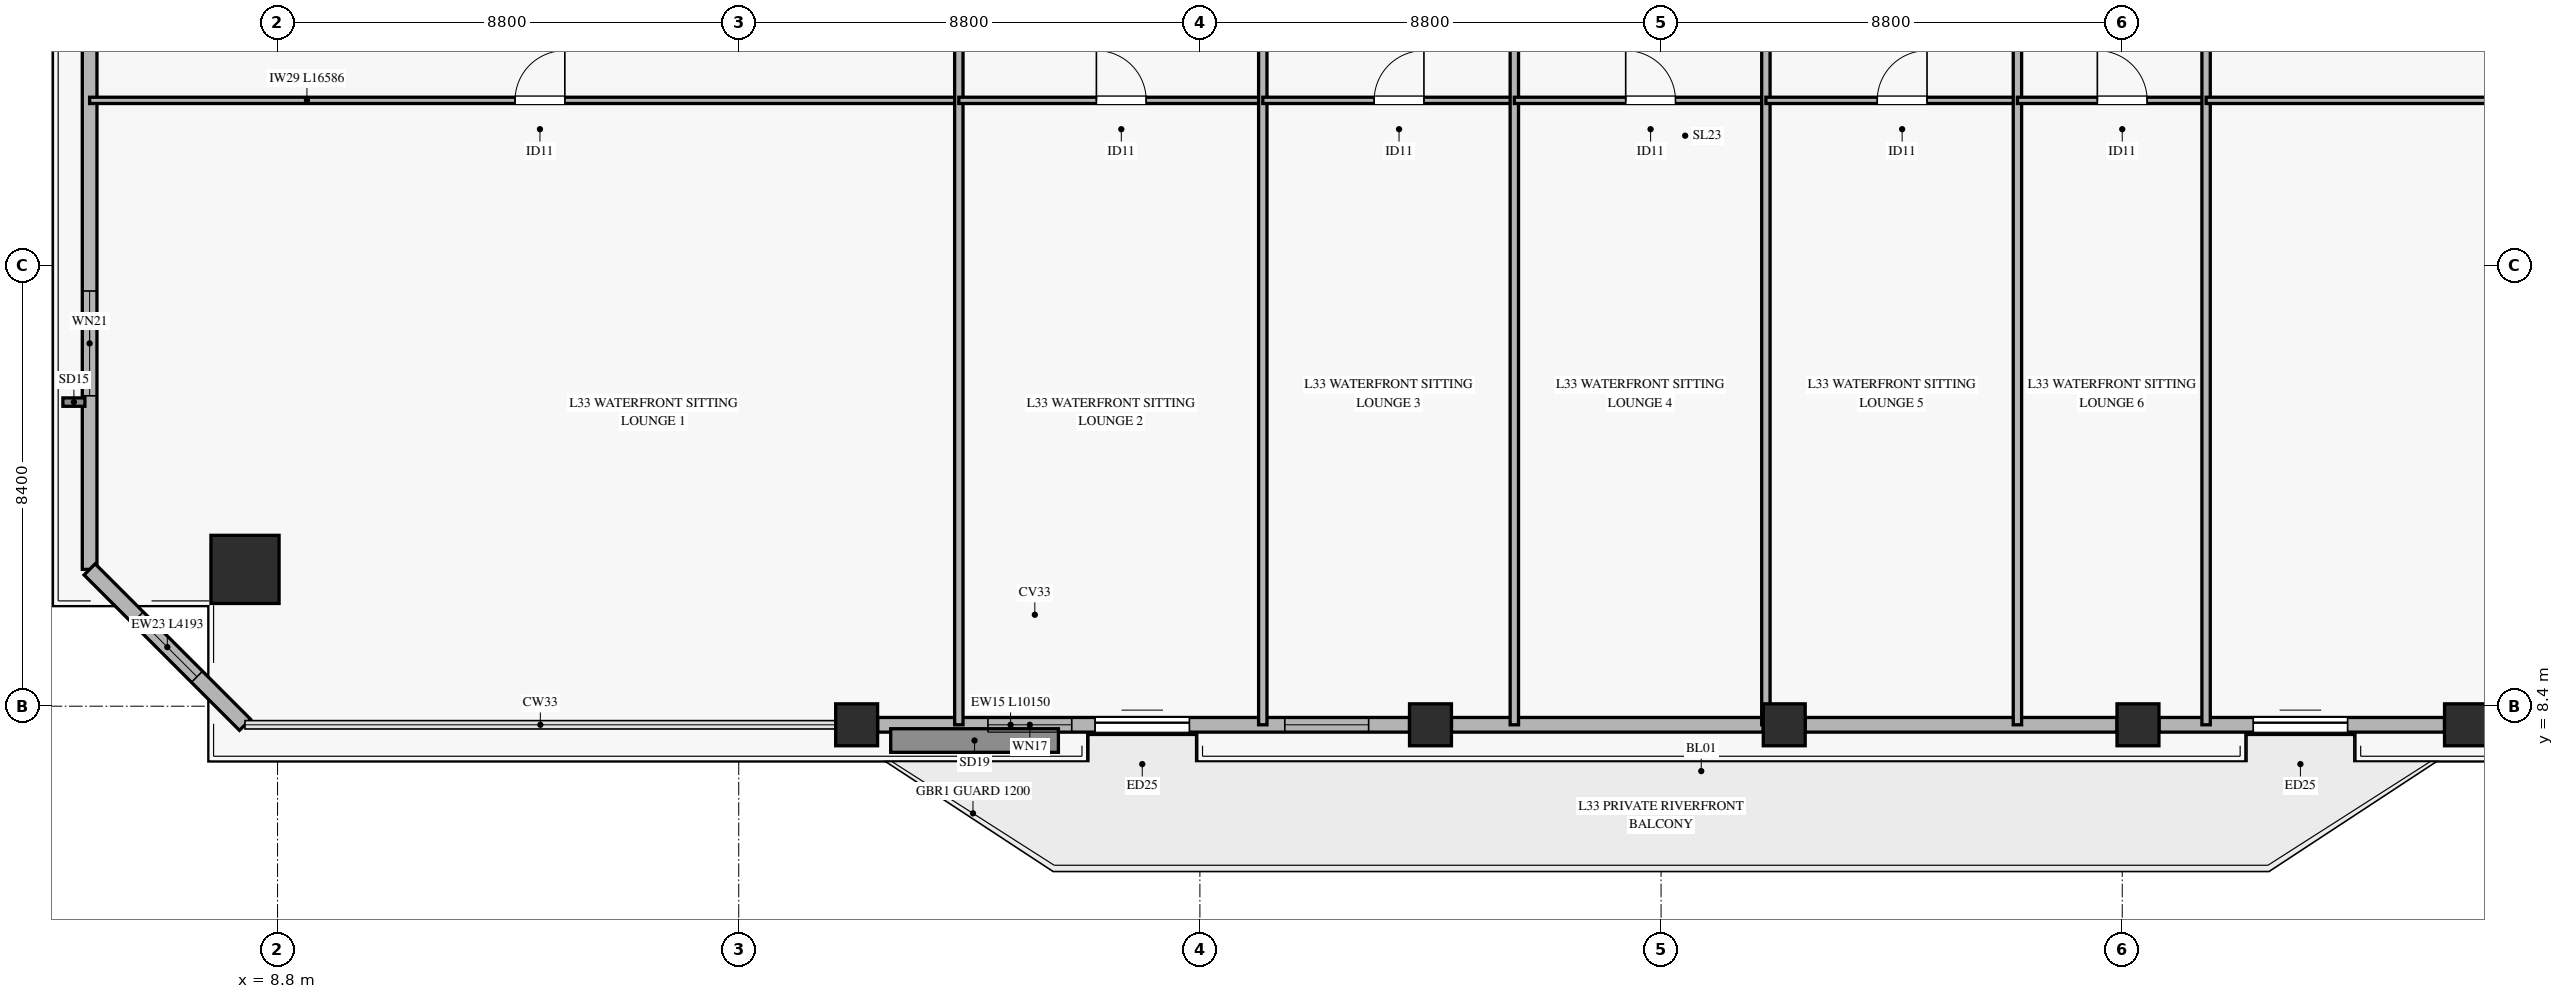
"""IFC4 building model, lengths in metres.
Left out: names, types, materials, properties, quantities, classifications, styles, units other than length and angle.
Written with IfcOpenShell. Run it as: python <this file> out.ifc"""

import sys

from ifc_helpers import new_model, si_unit, direction, frame, frame_2d, origin, origin_2d, place, context, subcontext, project, spatial, rectangle, hollow_rectangle, extrude, source, transform, mapped, element, fill, save


model = new_model("IFC4")
c1 = context("Model", 3, precision=1e-05, world=origin(), true_north=direction((0.0, 1.0)))
c2 = subcontext(c1, "Body", "Model", "MODEL_VIEW")
j1 = project(units=[si_unit("LENGTHUNIT", "METRE"), si_unit("PLANEANGLEUNIT", "RADIAN")], contexts=[c1])
p1 = place(None, origin())
s1 = spatial("IfcSite", under=j1, at=p1, CompositionType="ELEMENT")
p2 = place(p1, origin())
s2 = spatial("IfcBuilding", under=s1, at=p2, CompositionType="ELEMENT")
p3 = place(p2, frame((0.0, 0.0, 137.7)))
s3 = spatial("IfcBuildingStorey", under=s2, at=p3, CompositionType="ELEMENT", Elevation=137.7)
m1 = source(origin(), c2, "Body", "SweptSolid", [
    extrude(hollow_rectangle(XDim=1.3, YDim=1.3, WallThickness=0.06, at=origin_2d()), origin(), (0.0, 0.0, 1.0), 3.27),
])
p4 = place(p3, frame((8.179, 11.01, 0.0), z_axis=(0.0, 0.0, 1.0), x_axis=(1.0, 0.0, 0.0)))
e1 = element("IfcColumn", 1, at=p4, inside=s3, PredefinedType="COLUMN", context=c2, shape_type="MappedRepresentation", body=[
    mapped(m1, transform((0.0, 0.0, 0.0), x_axis=(1.0, 0.0, 0.0), y_axis=(0.0, 1.0, 0.0), z_axis=(0.0, 0.0, 1.0), scale=1.0)),
])
m2 = source(origin(), c2, "Body", "SweptSolid", [
    extrude(hollow_rectangle(XDim=0.8, YDim=0.8, WallThickness=0.036, at=origin_2d()), origin(), (0.0, 0.0, 1.0), 3.27),
])
for number, where, z_axis, x_axis in (
    (2, (19.85, 8.045, 0.0), (0.0, 0.0, 1.0), (1.0, 0.0, 0.0)),
    (3, (30.8, 8.045, 0.0), (0.0, 0.0, 1.0), (1.0, 0.0, 0.0)),
    (4, (37.55, 8.045, 0.0), (0.0, 0.0, 1.0), (1.0, 0.0, 0.0)),
    (5, (44.3, 8.045, 0.0), (0.0, 0.0, 1.0), (1.0, 0.0, 0.0)),
    (6, (50.55, 8.045, 0.0), (0.0, 0.0, 1.0), (1.0, 0.0, 0.0)),
):
    element("IfcColumn", number, at=place(p3, frame(where, z_axis=z_axis, x_axis=x_axis)), inside=s3, PredefinedType="COLUMN", context=c2, shape_type="MappedRepresentation", body=[
        mapped(m2, transform((0.0, 0.0, 0.0), x_axis=(1.0, 0.0, 0.0), y_axis=(0.0, 1.0, 0.0), z_axis=(0.0, 0.0, 1.0), scale=1.0)),
    ])
p5 = place(p3, frame((20.25, 8.045, 0.0), z_axis=(0.0, 0.0, 1.0), x_axis=(1.0, 0.0, 0.0)))
e7 = element("IfcWall", 7, at=p5, inside=s3, PredefinedType="SOLIDWALL", context=c2, shape_type="SweptSolid", body=[
    extrude(rectangle(XDim=10.15, YDim=0.28, at=frame_2d((5.075, 0.0))), origin(), (0.0, 0.0, 1.0), 2.75),
])
p6 = place(p5, frame((4.15, 0.0, 0.0)))
e8 = element("IfcOpeningElement", 8, at=p6, cuts=e7, PredefinedType="OPENING", context=c2, shape_type="SweptSolid", body=[
    extrude(rectangle(XDim=1.8, YDim=2.25, at=frame_2d((0.9, 1.125))), frame((0.0, 0.15, 0.0), z_axis=(0.0, -1.0, 0.0), x_axis=(1.0, 0.0, 0.0)), (0.0, 0.0, 1.0), 0.3),
])
p7 = place(p5, frame((2.105, 0.0, 0.45)))
e9 = element("IfcOpeningElement", 9, at=p7, cuts=e7, PredefinedType="OPENING", context=c2, shape_type="SweptSolid", body=[
    extrude(rectangle(XDim=1.6, YDim=2.0, at=frame_2d((0.8, 1.0))), frame((0.0, 0.15, 0.0), z_axis=(0.0, -1.0, 0.0), x_axis=(1.0, 0.0, 0.0)), (0.0, 0.0, 1.0), 0.3),
])
p8 = place(p5, frame((7.77, 0.0, 0.45)))
e10 = element("IfcOpeningElement", 10, at=p8, cuts=e7, PredefinedType="OPENING", context=c2, shape_type="SweptSolid", body=[
    extrude(rectangle(XDim=1.6, YDim=2.0, at=frame_2d((0.8, 1.0))), frame((0.0, 0.15, 0.0), z_axis=(0.0, -1.0, 0.0), x_axis=(1.0, 0.0, 0.0)), (0.0, 0.0, 1.0), 0.3),
])
for number, where, z_axis, x_axis in (
    (11, (31.2, 8.045, 0.0), (0.0, 0.0, 1.0), (1.0, 0.0, 0.0)),
    (12, (37.95, 8.045, 0.0), (0.0, 0.0, 1.0), (1.0, 0.0, 0.0)),
):
    element("IfcWall", number, at=place(p3, frame(where, z_axis=z_axis, x_axis=x_axis)), inside=s3, PredefinedType="SOLIDWALL", context=c2, shape_type="SweptSolid", body=[
        extrude(rectangle(XDim=5.95, YDim=0.28, at=frame_2d((2.975, 0.0))), origin(), (0.0, 0.0, 1.0), 2.75),
    ])
p9 = place(p3, frame((44.7, 8.045, 0.0), z_axis=(0.0, 0.0, 1.0), x_axis=(1.0, 0.0, 0.0)))
e13 = element("IfcWall", 13, at=p9, inside=s3, PredefinedType="SOLIDWALL", context=c2, shape_type="SweptSolid", body=[
    extrude(rectangle(XDim=5.45, YDim=0.28, at=frame_2d((2.725, 0.0))), origin(), (0.0, 0.0, 1.0), 2.75),
])
p10 = place(p9, frame((1.8, 0.0, 0.0)))
e14 = element("IfcOpeningElement", 14, at=p10, cuts=e13, PredefinedType="OPENING", context=c2, shape_type="SweptSolid", body=[
    extrude(rectangle(XDim=1.8, YDim=2.25, at=frame_2d((0.9, 1.125))), frame((0.0, 0.15, 0.0), z_axis=(0.0, -1.0, 0.0), x_axis=(1.0, 0.0, 0.0)), (0.0, 0.0, 1.0), 0.3),
])
p11 = place(p3, frame((5.214, 11.01, 0.0), z_axis=(0.0, 0.0, 1.0), x_axis=(0.0, 1.0, 0.0)))
e15 = element("IfcWall", 15, at=p11, inside=s3, PredefinedType="SOLIDWALL", context=c2, shape_type="SweptSolid", body=[
    extrude(rectangle(XDim=15.662, YDim=0.28, at=frame_2d((7.831, 0.0))), origin(), (0.0, 0.0, 1.0), 2.75),
])
p12 = place(p11, frame((3.312, 0.0, 0.45)))
e16 = element("IfcOpeningElement", 16, at=p12, cuts=e15, PredefinedType="OPENING", context=c2, shape_type="SweptSolid", body=[
    extrude(rectangle(XDim=2.0, YDim=2.0, at=frame_2d((1.0, 1.0))), frame((0.0, 0.15, 0.0), z_axis=(0.0, -1.0, 0.0), x_axis=(1.0, 0.0, 0.0)), (0.0, 0.0, 1.0), 0.3),
])
p13 = place(p11, frame((10.643, 0.0, 0.45)))
e17 = element("IfcOpeningElement", 17, at=p13, cuts=e15, PredefinedType="OPENING", context=c2, shape_type="SweptSolid", body=[
    extrude(rectangle(XDim=2.0, YDim=2.0, at=frame_2d((1.0, 1.0))), frame((0.0, 0.15, 0.0), z_axis=(0.0, -1.0, 0.0), x_axis=(1.0, 0.0, 0.0)), (0.0, 0.0, 1.0), 0.3),
])
p14 = place(p3, frame((5.214, 11.01, 0.0), z_axis=(0.0, 0.0, 1.0), x_axis=(0.707077668364, -0.70713589281, 0.0)))
e18 = element("IfcWall", 18, at=p14, inside=s3, PredefinedType="SOLIDWALL", context=c2, shape_type="SweptSolid", body=[
    extrude(rectangle(XDim=4.193, YDim=0.3, at=frame_2d((2.097, 0.0))), origin(), (0.0, 0.0, 1.0), 2.75),
])
p15 = place(p14, frame((1.297, 0.0, 0.45)))
e19 = element("IfcOpeningElement", 19, at=p15, cuts=e18, PredefinedType="OPENING", context=c2, shape_type="SweptSolid", body=[
    extrude(rectangle(XDim=1.6, YDim=2.0, at=frame_2d((0.8, 1.0))), frame((0.0, 0.16, 0.0), z_axis=(0.0, -1.0, 0.0), x_axis=(1.0, 0.0, 0.0)), (0.0, 0.0, 1.0), 0.32),
])
p16 = place(p3, frame((5.214, 19.959, 0.0), z_axis=(0.0, 0.0, 1.0), x_axis=(1.0, 0.0, 0.0)))
e20 = element("IfcWall", 20, at=p16, inside=s3, PredefinedType="PARTITIONING", context=c2, shape_type="SweptSolid", body=[
    extrude(rectangle(XDim=16.586, YDim=0.12, at=frame_2d((8.293, 0.0))), origin(), (0.0, 0.0, 1.0), 2.455),
])
p17 = place(p16, frame((8.118, 0.0, 0.0)))
e21 = element("IfcOpeningElement", 21, at=p17, cuts=e20, PredefinedType="OPENING", context=c2, shape_type="SweptSolid", body=[
    extrude(rectangle(XDim=0.95, YDim=2.1, at=frame_2d((0.475, 1.05))), frame((0.0, 0.07, 0.0), z_axis=(0.0, -1.0, 0.0), x_axis=(1.0, 0.0, 0.0)), (0.0, 0.0, 1.0), 0.14),
])
p18 = place(p3, frame((21.8, 8.045, 0.0), z_axis=(0.0, 0.0, 1.0), x_axis=(0.0, 1.0, 0.0)))
e22 = element("IfcWall", 22, at=p18, inside=s3, PredefinedType="PARTITIONING", context=c2, shape_type="SweptSolid", body=[
    extrude(rectangle(XDim=27.155, YDim=0.16, at=frame_2d((13.578, 0.0))), origin(), (0.0, 0.0, 1.0), 2.755),
])
p19 = place(p3, frame((21.8, 19.959, 0.0), z_axis=(0.0, 0.0, 1.0), x_axis=(1.0, 0.0, 0.0)))
e23 = element("IfcWall", 23, at=p19, inside=s3, PredefinedType="PARTITIONING", context=c2, shape_type="SweptSolid", body=[
    extrude(rectangle(XDim=5.8, YDim=0.12, at=frame_2d((2.9, 0.0))), origin(), (0.0, 0.0, 1.0), 3.27),
])
p20 = place(p19, frame((2.625, 0.0, 0.0)))
e24 = element("IfcOpeningElement", 24, at=p20, cuts=e23, PredefinedType="OPENING", context=c2, shape_type="SweptSolid", body=[
    extrude(rectangle(XDim=0.95, YDim=2.1, at=frame_2d((0.475, 1.05))), frame((0.0, 0.07, 0.0), z_axis=(0.0, -1.0, 0.0), x_axis=(1.0, 0.0, 0.0)), (0.0, 0.0, 1.0), 0.14),
])
p21 = place(p3, frame((27.6, 8.045, 0.0), z_axis=(0.0, 0.0, 1.0), x_axis=(0.0, 1.0, 0.0)))
e25 = element("IfcWall", 25, at=p21, inside=s3, PredefinedType="PARTITIONING", context=c2, shape_type="SweptSolid", body=[
    extrude(rectangle(XDim=27.155, YDim=0.16, at=frame_2d((13.578, 0.0))), origin(), (0.0, 0.0, 1.0), 2.755),
])
p22 = place(p3, frame((27.6, 19.959, 0.0), z_axis=(0.0, 0.0, 1.0), x_axis=(1.0, 0.0, 0.0)))
e26 = element("IfcWall", 26, at=p22, inside=s3, PredefinedType="PARTITIONING", context=c2, shape_type="SweptSolid", body=[
    extrude(rectangle(XDim=4.8, YDim=0.12, at=frame_2d((2.4, 0.0))), origin(), (0.0, 0.0, 1.0), 2.455),
])
p23 = place(p22, frame((2.125, 0.0, 0.0)))
e27 = element("IfcOpeningElement", 27, at=p23, cuts=e26, PredefinedType="OPENING", context=c2, shape_type="SweptSolid", body=[
    extrude(rectangle(XDim=0.95, YDim=2.1, at=frame_2d((0.475, 1.05))), frame((0.0, 0.07, 0.0), z_axis=(0.0, -1.0, 0.0), x_axis=(1.0, 0.0, 0.0)), (0.0, 0.0, 1.0), 0.14),
])
p24 = place(p3, frame((32.4, 8.045, 0.0), z_axis=(0.0, 0.0, 1.0), x_axis=(0.0, 1.0, 0.0)))
e28 = element("IfcWall", 28, at=p24, inside=s3, PredefinedType="PARTITIONING", context=c2, shape_type="SweptSolid", body=[
    extrude(rectangle(XDim=27.155, YDim=0.16, at=frame_2d((13.578, 0.0))), origin(), (0.0, 0.0, 1.0), 2.755),
])
p25 = place(p3, frame((32.4, 19.959, 0.0), z_axis=(0.0, 0.0, 1.0), x_axis=(1.0, 0.0, 0.0)))
e29 = element("IfcWall", 29, at=p25, inside=s3, PredefinedType="PARTITIONING", context=c2, shape_type="SweptSolid", body=[
    extrude(rectangle(XDim=4.8, YDim=0.12, at=frame_2d((2.4, 0.0))), origin(), (0.0, 0.0, 1.0), 3.27),
])
p26 = place(p25, frame((2.125, 0.0, 0.0)))
e30 = element("IfcOpeningElement", 30, at=p26, cuts=e29, PredefinedType="OPENING", context=c2, shape_type="SweptSolid", body=[
    extrude(rectangle(XDim=0.95, YDim=2.1, at=frame_2d((0.475, 1.05))), frame((0.0, 0.07, 0.0), z_axis=(0.0, -1.0, 0.0), x_axis=(1.0, 0.0, 0.0)), (0.0, 0.0, 1.0), 0.14),
])
p27 = place(p3, frame((37.2, 8.045, 0.0), z_axis=(0.0, 0.0, 1.0), x_axis=(0.0, 1.0, 0.0)))
e31 = element("IfcWall", 31, at=p27, inside=s3, PredefinedType="PARTITIONING", context=c2, shape_type="SweptSolid", body=[
    extrude(rectangle(XDim=27.155, YDim=0.16, at=frame_2d((13.578, 0.0))), origin(), (0.0, 0.0, 1.0), 2.805),
])
p28 = place(p3, frame((37.2, 19.959, 0.0), z_axis=(0.0, 0.0, 1.0), x_axis=(1.0, 0.0, 0.0)))
e32 = element("IfcWall", 32, at=p28, inside=s3, PredefinedType="PARTITIONING", context=c2, shape_type="SweptSolid", body=[
    extrude(rectangle(XDim=4.8, YDim=0.12, at=frame_2d((2.4, 0.0))), origin(), (0.0, 0.0, 1.0), 2.455),
])
p29 = place(p28, frame((2.125, 0.0, 0.0)))
e33 = element("IfcOpeningElement", 33, at=p29, cuts=e32, PredefinedType="OPENING", context=c2, shape_type="SweptSolid", body=[
    extrude(rectangle(XDim=0.95, YDim=2.1, at=frame_2d((0.475, 1.05))), frame((0.0, 0.07, 0.0), z_axis=(0.0, -1.0, 0.0), x_axis=(1.0, 0.0, 0.0)), (0.0, 0.0, 1.0), 0.14),
])
p30 = place(p3, frame((42.0, 8.045, 0.0), z_axis=(0.0, 0.0, 1.0), x_axis=(0.0, 1.0, 0.0)))
e34 = element("IfcWall", 34, at=p30, inside=s3, PredefinedType="PARTITIONING", context=c2, shape_type="SweptSolid", body=[
    extrude(rectangle(XDim=27.155, YDim=0.16, at=frame_2d((13.578, 0.0))), origin(), (0.0, 0.0, 1.0), 2.755),
])
p31 = place(p3, frame((42.0, 19.959, 0.0), z_axis=(0.0, 0.0, 1.0), x_axis=(1.0, 0.0, 0.0)))
e35 = element("IfcWall", 35, at=p31, inside=s3, PredefinedType="PARTITIONING", context=c2, shape_type="SweptSolid", body=[
    extrude(rectangle(XDim=3.6, YDim=0.12, at=frame_2d((1.8, 0.0))), origin(), (0.0, 0.0, 1.0), 2.455),
])
p32 = place(p31, frame((1.525, 0.0, 0.0)))
e36 = element("IfcOpeningElement", 36, at=p32, cuts=e35, PredefinedType="OPENING", context=c2, shape_type="SweptSolid", body=[
    extrude(rectangle(XDim=0.95, YDim=2.1, at=frame_2d((0.475, 1.05))), frame((0.0, 0.07, 0.0), z_axis=(0.0, -1.0, 0.0), x_axis=(1.0, 0.0, 0.0)), (0.0, 0.0, 1.0), 0.14),
])
p33 = place(p3, frame((45.6, 8.045, 0.0), z_axis=(0.0, 0.0, 1.0), x_axis=(0.0, 1.0, 0.0)))
e37 = element("IfcWall", 37, at=p33, inside=s3, PredefinedType="PARTITIONING", context=c2, shape_type="SweptSolid", body=[
    extrude(rectangle(XDim=27.155, YDim=0.16, at=frame_2d((13.578, 0.0))), origin(), (0.0, 0.0, 1.0), 2.755),
])
p34 = place(p3, frame((45.6, 19.959, 0.0), z_axis=(0.0, 0.0, 1.0), x_axis=(1.0, 0.0, 0.0)))
e38 = element("IfcWall", 38, at=p34, inside=s3, PredefinedType="PARTITIONING", context=c2, shape_type="SweptSolid", body=[
    extrude(rectangle(XDim=19.586, YDim=0.12, at=frame_2d((9.793, 0.0))), origin(), (0.0, 0.0, 1.0), 2.455),
])
p35 = place(p34, frame((9.418, 0.0, 0.0)))
e39 = element("IfcOpeningElement", 39, at=p35, cuts=e38, PredefinedType="OPENING", context=c2, shape_type="SweptSolid", body=[
    extrude(rectangle(XDim=0.95, YDim=2.1, at=frame_2d((0.475, 1.05))), frame((0.0, 0.07, 0.0), z_axis=(0.0, -1.0, 0.0), x_axis=(1.0, 0.0, 0.0)), (0.0, 0.0, 1.0), 0.14),
])
m3 = source(origin(), c2, "Body", "SweptSolid", [
    extrude(rectangle(XDim=1.8, YDim=2.25, at=frame_2d((0.9, 1.125))), frame((0.0, 0.025, 0.0), z_axis=(0.0, -1.0, 0.0), x_axis=(1.0, 0.0, 0.0)), (0.0, 0.0, 1.0), 0.05),
])
p36 = place(p6, origin())
e40 = element("IfcDoor", 40, at=p36, inside=s3, OperationType="SLIDING_TO_LEFT", PredefinedType="DOOR", context=c2, shape_type="MappedRepresentation", body=[
    mapped(m3, transform((0.0, 0.0, 0.0), x_axis=(1.0, 0.0, 0.0), y_axis=(0.0, 1.0, 0.0), z_axis=(0.0, 0.0, 1.0), scale=1.0)),
])
fill(e8, e40)
m4 = source(origin(), c2, "Body", "SweptSolid", [
    extrude(rectangle(XDim=1.6, YDim=2.0, at=frame_2d((0.8, 1.0))), frame((0.0, 0.03, 0.0), z_axis=(0.0, -1.0, 0.0), x_axis=(1.0, 0.0, 0.0)), (0.0, 0.0, 1.0), 0.06),
])
p37 = place(p7, origin())
e41 = element("IfcWindow", 41, at=p37, inside=s3, PartitioningType="SINGLE_PANEL", PredefinedType="WINDOW", context=c2, shape_type="MappedRepresentation", body=[
    mapped(m4, transform((0.0, 0.0, 0.0), x_axis=(1.0, 0.0, 0.0), y_axis=(0.0, 1.0, 0.0), z_axis=(0.0, 0.0, 1.0), scale=1.0)),
])
fill(e9, e41)
p38 = place(p8, origin())
e42 = element("IfcWindow", 42, at=p38, inside=s3, PartitioningType="SINGLE_PANEL", PredefinedType="WINDOW", context=c2, shape_type="MappedRepresentation", body=[
    mapped(m4, transform((0.0, 0.0, 0.0), x_axis=(1.0, 0.0, 0.0), y_axis=(0.0, 1.0, 0.0), z_axis=(0.0, 0.0, 1.0), scale=1.0)),
])
fill(e10, e42)
p39 = place(p10, origin())
e43 = element("IfcDoor", 43, at=p39, inside=s3, OperationType="SLIDING_TO_LEFT", PredefinedType="DOOR", context=c2, shape_type="MappedRepresentation", body=[
    mapped(m3, transform((0.0, 0.0, 0.0), x_axis=(1.0, 0.0, 0.0), y_axis=(0.0, 1.0, 0.0), z_axis=(0.0, 0.0, 1.0), scale=1.0)),
])
fill(e14, e43)
m5 = source(origin(), c2, "Body", "SweptSolid", [
    extrude(rectangle(XDim=2.0, YDim=2.0, at=frame_2d((1.0, 1.0))), frame((0.0, 0.03, 0.0), z_axis=(0.0, -1.0, 0.0), x_axis=(1.0, 0.0, 0.0)), (0.0, 0.0, 1.0), 0.06),
])
p40 = place(p12, origin())
e44 = element("IfcWindow", 44, at=p40, inside=s3, PartitioningType="SINGLE_PANEL", PredefinedType="WINDOW", context=c2, shape_type="MappedRepresentation", body=[
    mapped(m5, transform((0.0, 0.0, 0.0), x_axis=(1.0, 0.0, 0.0), y_axis=(0.0, 1.0, 0.0), z_axis=(0.0, 0.0, 1.0), scale=1.0)),
])
fill(e16, e44)
p41 = place(p15, origin())
e45 = element("IfcWindow", 45, at=p41, inside=s3, PartitioningType="SINGLE_PANEL", PredefinedType="WINDOW", context=c2, shape_type="MappedRepresentation", body=[
    mapped(m4, transform((0.0, 0.0, 0.0), x_axis=(1.0, 0.0, 0.0), y_axis=(0.0, 1.0, 0.0), z_axis=(0.0, 0.0, 1.0), scale=1.0)),
])
fill(e19, e45)
m6 = source(origin(), c2, "Body", "SweptSolid", [
    extrude(rectangle(XDim=0.95, YDim=2.1, at=frame_2d((0.475, 1.05))), frame((0.0, 0.025, 0.0), z_axis=(0.0, -1.0, 0.0), x_axis=(1.0, 0.0, 0.0)), (0.0, 0.0, 1.0), 0.05),
])
p42 = place(p17, origin())
e46 = element("IfcDoor", 46, at=p42, inside=s3, OperationType="SINGLE_SWING_RIGHT", PredefinedType="DOOR", context=c2, shape_type="MappedRepresentation", body=[
    mapped(m6, transform((0.0, 0.0, 0.0), x_axis=(1.0, 0.0, 0.0), y_axis=(0.0, 1.0, 0.0), z_axis=(0.0, 0.0, 1.0), scale=1.0)),
])
fill(e21, e46)
p43 = place(p20, origin())
e47 = element("IfcDoor", 47, at=p43, inside=s3, OperationType="SINGLE_SWING_LEFT", PredefinedType="DOOR", context=c2, shape_type="MappedRepresentation", body=[
    mapped(m6, transform((0.0, 0.0, 0.0), x_axis=(1.0, 0.0, 0.0), y_axis=(0.0, 1.0, 0.0), z_axis=(0.0, 0.0, 1.0), scale=1.0)),
])
fill(e24, e47)
p44 = place(p23, origin())
e48 = element("IfcDoor", 48, at=p44, inside=s3, OperationType="SINGLE_SWING_RIGHT", PredefinedType="DOOR", context=c2, shape_type="MappedRepresentation", body=[
    mapped(m6, transform((0.0, 0.0, 0.0), x_axis=(1.0, 0.0, 0.0), y_axis=(0.0, 1.0, 0.0), z_axis=(0.0, 0.0, 1.0), scale=1.0)),
])
fill(e27, e48)
p45 = place(p26, origin())
e49 = element("IfcDoor", 49, at=p45, inside=s3, OperationType="SINGLE_SWING_LEFT", PredefinedType="DOOR", context=c2, shape_type="MappedRepresentation", body=[
    mapped(m6, transform((0.0, 0.0, 0.0), x_axis=(1.0, 0.0, 0.0), y_axis=(0.0, 1.0, 0.0), z_axis=(0.0, 0.0, 1.0), scale=1.0)),
])
fill(e30, e49)
p46 = place(p29, origin())
e50 = element("IfcDoor", 50, at=p46, inside=s3, OperationType="SINGLE_SWING_RIGHT", PredefinedType="DOOR", context=c2, shape_type="MappedRepresentation", body=[
    mapped(m6, transform((0.0, 0.0, 0.0), x_axis=(1.0, 0.0, 0.0), y_axis=(0.0, 1.0, 0.0), z_axis=(0.0, 0.0, 1.0), scale=1.0)),
])
fill(e33, e50)
p47 = place(p32, origin())
e51 = element("IfcDoor", 51, at=p47, inside=s3, OperationType="SINGLE_SWING_LEFT", PredefinedType="DOOR", context=c2, shape_type="MappedRepresentation", body=[
    mapped(m6, transform((0.0, 0.0, 0.0), x_axis=(1.0, 0.0, 0.0), y_axis=(0.0, 1.0, 0.0), z_axis=(0.0, 0.0, 1.0), scale=1.0)),
])
fill(e36, e51)
save(model, sys.argv[1])
